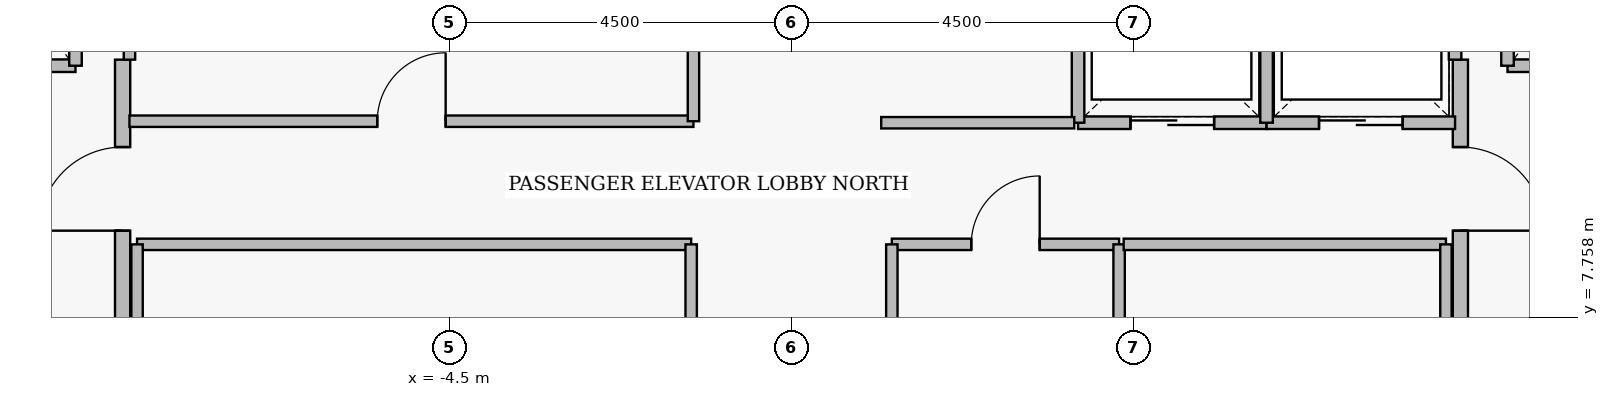
"""IFC4 building model, lengths in metres.
Left out: names, types, materials, properties, quantities, classifications, styles, units other than length and angle.
Written with IfcOpenShell. Run it as: python <this file> out.ifc"""

import sys

from ifc_helpers import new_model, si_unit, direction, frame, frame_2d, origin, place, context, subcontext, project, spatial, rectangle, extrude, element, fill, save


model = new_model("IFC4")
c1 = context("Model", 3, precision=1e-05, world=origin(), true_north=direction((0.0, 1.0)))
c2 = subcontext(c1, "Body", "Model", "MODEL_VIEW")
j1 = project(units=[si_unit("LENGTHUNIT", "METRE"), si_unit("PLANEANGLEUNIT", "RADIAN")], contexts=[c1])
p1 = place(None, origin())
s1 = spatial("IfcSite", under=j1, at=p1, CompositionType="ELEMENT")
p2 = place(p1, origin())
s2 = spatial("IfcBuilding", under=s1, at=p2, CompositionType="ELEMENT")
p3 = place(p2, frame((0.0, 0.0, 261.85)))
s3 = spatial("IfcBuildingStorey", under=s2, at=p3, CompositionType="ELEMENT", Elevation=261.85)
p4 = place(p3, frame((-8.8, 5.05, 0.0), z_axis=(0.0, 0.0, 1.0), x_axis=(0.0, 1.0, 0.0)))
e1 = element("IfcWall", 1, at=p4, inside=s3, PredefinedType="PARTITIONING", context=c2, shape_type="SweptSolid", body=[
    extrude(rectangle(XDim=6.1, YDim=0.2, at=frame_2d((3.05, 0.0))), origin(), (0.0, 0.0, 1.0), 3.48),
])
p5 = place(p4, frame((0.25, 0.0, 0.0)))
e2 = element("IfcOpeningElement", 2, at=p5, cuts=e1, PredefinedType="OPENING", context=c2, shape_type="SweptSolid", body=[
    extrude(rectangle(XDim=1.1, YDim=2.2, at=frame_2d((0.55, 1.1))), frame((0.0, 0.11, 0.0), z_axis=(0.0, -1.0, 0.0), x_axis=(1.0, 0.0, 0.0)), (0.0, 0.0, 1.0), 0.22),
])
p6 = place(p4, frame((3.85, 0.0, 0.0)))
e3 = element("IfcOpeningElement", 3, at=p6, cuts=e1, PredefinedType="OPENING", context=c2, shape_type="SweptSolid", body=[
    extrude(rectangle(XDim=1.1, YDim=2.2, at=frame_2d((0.55, 1.1))), frame((0.0, 0.11, 0.0), z_axis=(0.0, -1.0, 0.0), x_axis=(1.0, 0.0, 0.0)), (0.0, 0.0, 1.0), 0.22),
])
p7 = place(p3, frame((8.8, 11.15, 0.0), z_axis=(0.0, 0.0, 1.0), x_axis=(0.0, -1.0, 0.0)))
e4 = element("IfcWall", 4, at=p7, inside=s3, PredefinedType="PARTITIONING", context=c2, shape_type="SweptSolid", body=[
    extrude(rectangle(XDim=6.1, YDim=0.2, at=frame_2d((3.05, 0.0))), origin(), (0.0, 0.0, 1.0), 3.48),
])
p8 = place(p7, frame((1.15, 0.0, 0.0)))
e5 = element("IfcOpeningElement", 5, at=p8, cuts=e4, PredefinedType="OPENING", context=c2, shape_type="SweptSolid", body=[
    extrude(rectangle(XDim=1.1, YDim=2.2, at=frame_2d((0.55, 1.1))), frame((0.0, 0.11, 0.0), z_axis=(0.0, -1.0, 0.0), x_axis=(1.0, 0.0, 0.0)), (0.0, 0.0, 1.0), 0.22),
])
p9 = place(p7, frame((4.75, 0.0, 0.0)))
e6 = element("IfcOpeningElement", 6, at=p9, cuts=e4, PredefinedType="OPENING", context=c2, shape_type="SweptSolid", body=[
    extrude(rectangle(XDim=1.1, YDim=2.2, at=frame_2d((0.55, 1.1))), frame((0.0, 0.11, 0.0), z_axis=(0.0, -1.0, 0.0), x_axis=(1.0, 0.0, 0.0)), (0.0, 0.0, 1.0), 0.22),
])
p10 = place(p3, frame((-11.58, 11.07, 0.0), z_axis=(0.0, 0.0, 1.0), x_axis=(1.0, 0.0, 0.0)))
e7 = element("IfcWall", 7, at=p10, inside=s3, PredefinedType="PARTITIONING", context=c2, shape_type="SweptSolid", body=[
    extrude(rectangle(XDim=2.16, YDim=0.165, at=frame_2d((1.08, 0.0))), origin(), (0.0, 0.0, 1.0), 3.48),
])
p11 = place(p10, frame((0.53, 0.0, 0.0)))
e8 = element("IfcOpeningElement", 8, at=p11, cuts=e7, PredefinedType="OPENING", context=c2, shape_type="SweptSolid", body=[
    extrude(rectangle(XDim=1.15, YDim=2.25, at=frame_2d((0.575, 1.125))), frame((0.0, 0.093, 0.0), z_axis=(0.0, -1.0, 0.0), x_axis=(1.0, 0.0, 0.0)), (0.0, 0.0, 1.0), 0.185),
])
p12 = place(p3, frame((9.42, 11.07, 0.0), z_axis=(0.0, 0.0, 1.0), x_axis=(1.0, 0.0, 0.0)))
e9 = element("IfcWall", 9, at=p12, inside=s3, PredefinedType="PARTITIONING", context=c2, shape_type="SweptSolid", body=[
    extrude(rectangle(XDim=2.16, YDim=0.165, at=frame_2d((1.08, 0.0))), origin(), (0.0, 0.0, 1.0), 3.48),
])
p13 = place(p12, frame((0.53, 0.0, 0.0)))
e10 = element("IfcOpeningElement", 10, at=p13, cuts=e9, PredefinedType="OPENING", context=c2, shape_type="SweptSolid", body=[
    extrude(rectangle(XDim=1.15, YDim=2.25, at=frame_2d((0.575, 1.125))), frame((0.0, 0.093, 0.0), z_axis=(0.0, -1.0, 0.0), x_axis=(1.0, 0.0, 0.0)), (0.0, 0.0, 1.0), 0.185),
])
p14 = place(p3, frame((3.77, 10.32, 0.0), z_axis=(0.0, 0.0, 1.0), x_axis=(1.0, 0.0, 0.0)))
e11 = element("IfcWall", 11, at=p14, inside=s3, PredefinedType="PARTITIONING", context=c2, shape_type="SweptSolid", body=[
    extrude(rectangle(XDim=2.48, YDim=0.165, at=frame_2d((1.24, 0.0))), origin(), (0.0, 0.0, 1.0), 3.48),
])
p15 = place(p14, frame((0.69, 0.0, 0.0)))
e12 = element("IfcOpeningElement", 12, at=p15, cuts=e11, PredefinedType="OPENING", context=c2, shape_type="SweptSolid", body=[
    extrude(rectangle(XDim=1.1, YDim=2.25, at=frame_2d((0.55, 1.125))), frame((0.0, 0.093, 0.0), z_axis=(0.0, -1.0, 0.0), x_axis=(1.0, 0.0, 0.0)), (0.0, 0.0, 1.0), 0.185),
])
p16 = place(p3, frame((6.25, 10.32, 0.0), z_axis=(0.0, 0.0, 1.0), x_axis=(1.0, 0.0, 0.0)))
e13 = element("IfcWall", 13, at=p16, inside=s3, PredefinedType="PARTITIONING", context=c2, shape_type="SweptSolid", body=[
    extrude(rectangle(XDim=2.48, YDim=0.165, at=frame_2d((1.24, 0.0))), origin(), (0.0, 0.0, 1.0), 3.48),
])
p17 = place(p16, frame((0.69, 0.0, 0.0)))
e14 = element("IfcOpeningElement", 14, at=p17, cuts=e13, PredefinedType="OPENING", context=c2, shape_type="SweptSolid", body=[
    extrude(rectangle(XDim=1.1, YDim=2.25, at=frame_2d((0.55, 1.125))), frame((0.0, 0.093, 0.0), z_axis=(0.0, -1.0, 0.0), x_axis=(1.0, 0.0, 0.0)), (0.0, 0.0, 1.0), 0.185),
])
p18 = place(p3, frame((-8.71, 10.34, 0.0), z_axis=(0.0, 0.0, 1.0), x_axis=(1.0, 0.0, 0.0)))
e15 = element("IfcWall", 15, at=p18, inside=s3, PredefinedType="PARTITIONING", context=c2, shape_type="SweptSolid", body=[
    extrude(rectangle(XDim=7.42, YDim=0.15, at=frame_2d((3.71, 0.0))), origin(), (0.0, 0.0, 1.0), 3.48),
])
p19 = place(p18, frame((3.26, 0.0, 0.0)))
e16 = element("IfcOpeningElement", 16, at=p19, cuts=e15, PredefinedType="OPENING", context=c2, shape_type="SweptSolid", body=[
    extrude(rectangle(XDim=0.9, YDim=2.15, at=frame_2d((0.45, 1.075))), frame((0.0, 0.085, 0.0), z_axis=(0.0, -1.0, 0.0), x_axis=(1.0, 0.0, 0.0)), (0.0, 0.0, 1.0), 0.17),
])
p20 = place(p3, frame((1.32, 8.72, 0.0), z_axis=(0.0, 0.0, 1.0), x_axis=(1.0, 0.0, 0.0)))
e17 = element("IfcWall", 17, at=p20, inside=s3, PredefinedType="PARTITIONING", context=c2, shape_type="SweptSolid", body=[
    extrude(rectangle(XDim=2.99, YDim=0.15, at=frame_2d((1.495, 0.0))), origin(), (0.0, 0.0, 1.0), 3.48),
])
p21 = place(p20, frame((1.045, 0.0, 0.0)))
e18 = element("IfcOpeningElement", 18, at=p21, cuts=e17, PredefinedType="OPENING", context=c2, shape_type="SweptSolid", body=[
    extrude(rectangle(XDim=0.9, YDim=2.15, at=frame_2d((0.45, 1.075))), frame((0.0, 0.085, 0.0), z_axis=(0.0, -1.0, 0.0), x_axis=(1.0, 0.0, 0.0)), (0.0, 0.0, 1.0), 0.17),
])
for number, where, z_axis, x_axis in (
    (19, (-9.42, 11.07, 0.0), (0.0, 0.0, 1.0), (0.0, 1.0, 0.0)),
    (20, (9.42, 11.07, 0.0), (0.0, 0.0, 1.0), (0.0, 1.0, 0.0)),
):
    element("IfcWall", number, at=place(p3, frame(where, z_axis=z_axis, x_axis=x_axis)), inside=s3, PredefinedType="PARTITIONING", context=c2, shape_type="SweptSolid", body=[
        extrude(rectangle(XDim=2.96, YDim=0.165, at=frame_2d((1.48, 0.0))), origin(), (0.0, 0.0, 1.0), 3.48),
    ])
for number, where, z_axis, x_axis in (
    (21, (3.77, 10.32, 0.0), (0.0, 0.0, 1.0), (0.0, 1.0, 0.0)),
    (22, (6.25, 10.32, 0.0), (0.0, 0.0, 1.0), (0.0, 1.0, 0.0)),
):
    element("IfcWall", number, at=place(p3, frame(where, z_axis=z_axis, x_axis=x_axis)), inside=s3, PredefinedType="PARTITIONING", context=c2, shape_type="SweptSolid", body=[
        extrude(rectangle(XDim=2.36, YDim=0.165, at=frame_2d((1.18, 0.0))), origin(), (0.0, 0.0, 1.0), 3.48),
    ])
p22 = place(p3, frame((8.73, 11.15, 0.0), z_axis=(0.0, 0.0, 1.0), x_axis=(0.0, 1.0, 0.0)))
e23 = element("IfcWall", 23, at=p22, inside=s3, PredefinedType="PARTITIONING", context=c2, shape_type="SweptSolid", body=[
    extrude(rectangle(XDim=1.53, YDim=0.165, at=frame_2d((0.765, 0.0))), origin(), (0.0, 0.0, 1.0), 3.48),
])
p23 = place(p3, frame((-8.71, 11.15, 0.0), z_axis=(0.0, 0.0, 1.0), x_axis=(0.0, 1.0, 0.0)))
e24 = element("IfcWall", 24, at=p23, inside=s3, PredefinedType="PARTITIONING", context=c2, shape_type="SweptSolid", body=[
    extrude(rectangle(XDim=1.71, YDim=0.15, at=frame_2d((0.855, 0.0))), origin(), (0.0, 0.0, 1.0), 3.48),
])
p24 = place(p3, frame((-1.29, 10.34, 0.0), z_axis=(0.0, 0.0, 1.0), x_axis=(0.0, 1.0, 0.0)))
e25 = element("IfcWall", 25, at=p24, inside=s3, PredefinedType="PARTITIONING", context=c2, shape_type="SweptSolid", body=[
    extrude(rectangle(XDim=2.52, YDim=0.15, at=frame_2d((1.26, 0.0))), origin(), (0.0, 0.0, 1.0), 3.48),
])
p25 = place(p3, frame((-8.61, 8.72, 0.0), z_axis=(0.0, 0.0, 1.0), x_axis=(1.0, 0.0, 0.0)))
e26 = element("IfcWall", 26, at=p25, inside=s3, PredefinedType="PARTITIONING", context=c2, shape_type="SweptSolid", body=[
    extrude(rectangle(XDim=7.29, YDim=0.15, at=frame_2d((3.645, 0.0))), origin(), (0.0, 0.0, 1.0), 3.48),
])
for number, where, z_axis, x_axis in (
    (27, (-8.61, 6.48, 0.0), (0.0, 0.0, 1.0), (0.0, 1.0, 0.0)),
    (28, (-1.32, 6.48, 0.0), (0.0, 0.0, 1.0), (0.0, 1.0, 0.0)),
    (29, (1.32, 6.48, 0.0), (0.0, 0.0, 1.0), (0.0, 1.0, 0.0)),
    (30, (4.31, 6.48, 0.0), (0.0, 0.0, 1.0), (0.0, 1.0, 0.0)),
):
    element("IfcWall", number, at=place(p3, frame(where, z_axis=z_axis, x_axis=x_axis)), inside=s3, PredefinedType="PARTITIONING", context=c2, shape_type="SweptSolid", body=[
        extrude(rectangle(XDim=2.24, YDim=0.15, at=frame_2d((1.12, 0.0))), origin(), (0.0, 0.0, 1.0), 3.48),
    ])
p26 = place(p3, frame((4.37, 8.72, 0.0), z_axis=(0.0, 0.0, 1.0), x_axis=(1.0, 0.0, 0.0)))
e31 = element("IfcWall", 31, at=p26, inside=s3, PredefinedType="PARTITIONING", context=c2, shape_type="SweptSolid", body=[
    extrude(rectangle(XDim=4.24, YDim=0.15, at=frame_2d((2.12, 0.0))), origin(), (0.0, 0.0, 1.0), 3.48),
])
p27 = place(p3, frame((8.61, 6.48, 0.0), z_axis=(0.0, 0.0, 1.0), x_axis=(0.0, 1.0, 0.0)))
e32 = element("IfcWall", 32, at=p27, inside=s3, PredefinedType="PARTITIONING", context=c2, shape_type="SweptSolid", body=[
    extrude(rectangle(XDim=2.24, YDim=0.15, at=frame_2d((1.12, 0.0))), origin(), (0.0, 0.0, 1.0), 3.48),
])
p28 = place(p3, frame((1.18, 10.32, 0.0), z_axis=(0.0, 0.0, 1.0), x_axis=(1.0, 0.0, 0.0)))
e33 = element("IfcWall", 33, at=p28, inside=s3, PredefinedType="PARTITIONING", context=c2, shape_type="SweptSolid", body=[
    extrude(rectangle(XDim=2.54, YDim=0.15, at=frame_2d((1.27, 0.0))), origin(), (0.0, 0.0, 1.0), 3.48),
])
p29 = place(p6, origin())
e34 = element("IfcDoor", 34, at=p29, inside=s3, OperationType="SINGLE_SWING_LEFT", PredefinedType="DOOR", context=c2, shape_type="SweptSolid", body=[
    extrude(rectangle(XDim=1.1, YDim=2.2, at=frame_2d((0.55, 1.1))), frame((0.0, 0.025, 0.0), z_axis=(0.0, -1.0, 0.0), x_axis=(1.0, 0.0, 0.0)), (0.0, 0.0, 1.0), 0.05),
])
fill(e3, e34)
p30 = place(p8, origin())
e35 = element("IfcDoor", 35, at=p30, inside=s3, OperationType="SINGLE_SWING_RIGHT", PredefinedType="DOOR", context=c2, shape_type="SweptSolid", body=[
    extrude(rectangle(XDim=1.1, YDim=2.2, at=frame_2d((0.55, 1.1))), frame((0.0, 0.025, 0.0), z_axis=(0.0, -1.0, 0.0), x_axis=(1.0, 0.0, 0.0)), (0.0, 0.0, 1.0), 0.05),
])
fill(e5, e35)
p31 = place(p15, origin())
e36 = element("IfcDoor", 36, at=p31, inside=s3, OperationType="SLIDING_TO_LEFT", PredefinedType="DOOR", context=c2, shape_type="SweptSolid", body=[
    extrude(rectangle(XDim=1.1, YDim=2.25, at=frame_2d((0.55, 1.125))), frame((0.0, 0.025, 0.0), z_axis=(0.0, -1.0, 0.0), x_axis=(1.0, 0.0, 0.0)), (0.0, 0.0, 1.0), 0.05),
])
fill(e12, e36)
p32 = place(p17, origin())
e37 = element("IfcDoor", 37, at=p32, inside=s3, OperationType="SLIDING_TO_LEFT", PredefinedType="DOOR", context=c2, shape_type="SweptSolid", body=[
    extrude(rectangle(XDim=1.1, YDim=2.25, at=frame_2d((0.55, 1.125))), frame((0.0, 0.025, 0.0), z_axis=(0.0, -1.0, 0.0), x_axis=(1.0, 0.0, 0.0)), (0.0, 0.0, 1.0), 0.05),
])
fill(e14, e37)
p33 = place(p19, origin())
e38 = element("IfcDoor", 38, at=p33, inside=s3, OperationType="SINGLE_SWING_RIGHT", PredefinedType="DOOR", context=c2, shape_type="SweptSolid", body=[
    extrude(rectangle(XDim=0.9, YDim=2.15, at=frame_2d((0.45, 1.075))), frame((0.0, 0.025, 0.0), z_axis=(0.0, -1.0, 0.0), x_axis=(1.0, 0.0, 0.0)), (0.0, 0.0, 1.0), 0.05),
])
fill(e16, e38)
p34 = place(p21, origin())
e39 = element("IfcDoor", 39, at=p34, inside=s3, OperationType="SINGLE_SWING_RIGHT", PredefinedType="DOOR", context=c2, shape_type="SweptSolid", body=[
    extrude(rectangle(XDim=0.9, YDim=2.15, at=frame_2d((0.45, 1.075))), frame((0.0, 0.025, 0.0), z_axis=(0.0, -1.0, 0.0), x_axis=(1.0, 0.0, 0.0)), (0.0, 0.0, 1.0), 0.05),
])
fill(e18, e39)
save(model, sys.argv[1])
